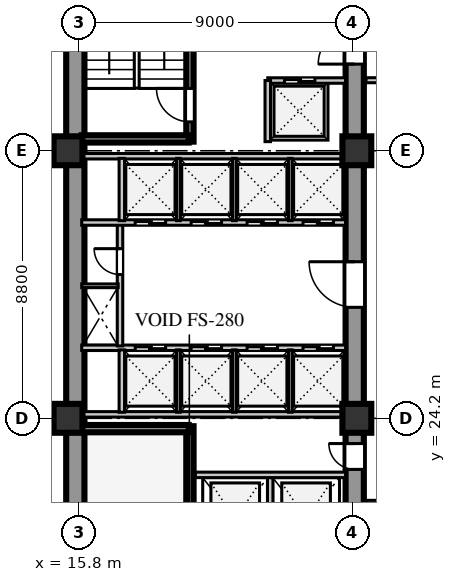
"""IFC4 building model, lengths in metres.
Left out: names, types, materials, properties, quantities, classifications, styles, units other than length and angle.
Written with IfcOpenShell. Run it as: python <this file> out.ifc"""

import sys

from ifc_helpers import new_model, si_unit, direction, frame, frame_2d, origin, origin_2d, place, context, subcontext, project, spatial, rectangle, extrude, element, fill, save


model = new_model("IFC4")
c1 = context("Model", 3, precision=1e-05, world=origin(), true_north=direction((0.0, 1.0)))
c2 = subcontext(c1, "Body", "Model", "MODEL_VIEW")
j1 = project(units=[si_unit("LENGTHUNIT", "METRE"), si_unit("PLANEANGLEUNIT", "RADIAN")], contexts=[c1])
p1 = place(None, origin())
s1 = spatial("IfcSite", under=j1, at=p1, CompositionType="ELEMENT")
p2 = place(p1, origin())
s2 = spatial("IfcBuilding", under=s1, at=p2, CompositionType="ELEMENT")
p3 = place(p2, frame((0.0, 0.0, 66.0)))
s3 = spatial("IfcBuildingStorey", under=s2, at=p3, CompositionType="ELEMENT", Elevation=66.0)
p4 = place(p3, frame((15.69, 15.81, 0.0), z_axis=(0.0, 0.0, 1.0), x_axis=(0.0, 1.0, 0.0)))
e1 = element("IfcWall", 1, at=p4, inside=s3, PredefinedType="SHEAR", context=c2, shape_type="SweptSolid", body=[
    extrude(rectangle(XDim=25.63, YDim=0.6, at=frame_2d((12.815, 0.0))), origin(), (0.0, 0.0, 1.0), 3.72),
])
p5 = place(p3, frame((24.88, 15.74, 0.0), z_axis=(0.0, 0.0, 1.0), x_axis=(0.0, 1.0, 0.0)))
e2 = element("IfcWall", 2, at=p5, inside=s3, PredefinedType="SHEAR", context=c2, shape_type="SweptSolid", body=[
    extrude(rectangle(XDim=25.76, YDim=0.6, at=frame_2d((12.88, 0.0))), origin(), (0.0, 0.0, 1.0), 3.72),
])
p6 = place(p5, frame((1.61, 0.0, 0.0)))
e3 = element("IfcOpeningElement", 3, at=p6, cuts=e2, PredefinedType="OPENING", context=c2, shape_type="SweptSolid", body=[
    extrude(rectangle(XDim=1.2, YDim=2.1, at=frame_2d((0.6, 1.05))), frame((0.0, 0.31, 0.0), z_axis=(0.0, -1.0, 0.0), x_axis=(1.0, 0.0, 0.0)), (0.0, 0.0, 1.0), 0.62),
])
p7 = place(p5, frame((6.78, 0.0, 0.0)))
e4 = element("IfcOpeningElement", 4, at=p7, cuts=e2, PredefinedType="OPENING", context=c2, shape_type="SweptSolid", body=[
    extrude(rectangle(XDim=0.85, YDim=2.06, at=frame_2d((0.425, 1.03))), frame((0.0, 0.31, 0.0), z_axis=(0.0, -1.0, 0.0), x_axis=(1.0, 0.0, 0.0)), (0.0, 0.0, 1.0), 0.62),
])
p8 = place(p5, frame((12.11, 0.0, 0.0)))
e5 = element("IfcOpeningElement", 5, at=p8, cuts=e2, PredefinedType="OPENING", context=c2, shape_type="SweptSolid", body=[
    extrude(rectangle(XDim=1.5, YDim=2.12, at=frame_2d((0.75, 1.06))), frame((0.0, 0.31, 0.0), z_axis=(0.0, -1.0, 0.0), x_axis=(1.0, 0.0, 0.0)), (0.0, 0.0, 1.0), 0.62),
])
p9 = place(p5, frame((20.11, 0.0, 0.0)))
e6 = element("IfcOpeningElement", 6, at=p9, cuts=e2, PredefinedType="OPENING", context=c2, shape_type="SweptSolid", body=[
    extrude(rectangle(XDim=1.2, YDim=2.12, at=frame_2d((0.6, 1.06))), frame((0.0, 0.31, 0.0), z_axis=(0.0, -1.0, 0.0), x_axis=(1.0, 0.0, 0.0)), (0.0, 0.0, 1.0), 0.62),
])
p10 = place(p5, frame((24.01, 0.0, 0.0)))
e7 = element("IfcOpeningElement", 7, at=p10, cuts=e2, PredefinedType="OPENING", context=c2, shape_type="SweptSolid", body=[
    extrude(rectangle(XDim=0.95, YDim=2.1, at=frame_2d((0.475, 1.05))), frame((0.0, 0.31, 0.0), z_axis=(0.0, -1.0, 0.0), x_axis=(1.0, 0.0, 0.0)), (0.0, 0.0, 1.0), 0.62),
])
for number, where, z_axis, x_axis in (
    (8, (15.45, 24.2, 0.0), (0.0, 0.0, 1.0), (1.0, 0.0, 0.0)),
    (9, (15.45, 33.0, 0.0), (0.0, 0.0, 1.0), (1.0, 0.0, 0.0)),
    (10, (24.95, 24.2, 0.0), (0.0, 0.0, 1.0), (1.0, 0.0, 0.0)),
    (11, (24.95, 33.0, 0.0), (0.0, 0.0, 1.0), (1.0, 0.0, 0.0)),
):
    element("IfcColumn", number, at=place(p3, frame(where, z_axis=z_axis, x_axis=x_axis)), inside=s3, PredefinedType="COLUMN", context=c2, shape_type="SweptSolid", body=[
        extrude(rectangle(XDim=0.95, YDim=0.95, at=origin_2d()), origin(), (0.0, 0.0, 1.0), 3.72),
    ])
p11 = place(p3, frame((19.46, 15.74, 0.0), z_axis=(0.0, 0.0, 1.0), x_axis=(0.0, 1.0, 0.0)))
e12 = element("IfcWall", 12, at=p11, inside=s3, PredefinedType="SHEAR", context=c2, shape_type="SweptSolid", body=[
    extrude(rectangle(XDim=8.2, YDim=0.24, at=frame_2d((4.1, 0.0))), origin(), (0.0, 0.0, 1.0), 4.0),
])
p12 = place(p11, frame((0.45, 0.0, 0.0)))
e13 = element("IfcOpeningElement", 13, at=p12, cuts=e12, PredefinedType="OPENING", context=c2, shape_type="SweptSolid", body=[
    extrude(rectangle(XDim=1.1, YDim=2.1, at=frame_2d((0.55, 1.05))), frame((0.0, 0.13, 0.0), z_axis=(0.0, -1.0, 0.0), x_axis=(1.0, 0.0, 0.0)), (0.0, 0.0, 1.0), 0.26),
])
p13 = place(p3, frame((15.9, 23.86, 0.0), z_axis=(0.0, 0.0, 1.0), x_axis=(1.0, 0.0, 0.0)))
e14 = element("IfcWall", 14, at=p13, inside=s3, PredefinedType="SHEAR", context=c2, shape_type="SweptSolid", body=[
    extrude(rectangle(XDim=3.52, YDim=0.24, at=frame_2d((1.76, 0.0))), origin(), (0.0, 0.0, 1.0), 4.0),
])
p14 = place(p3, frame((22.1, 19.51, 0.0), z_axis=(0.0, 0.0, 1.0), x_axis=(0.0, 1.0, 0.0)))
e15 = element("IfcWall", 15, at=p14, inside=s3, PredefinedType="SOLIDWALL", context=c2, shape_type="SweptSolid", body=[
    extrude(rectangle(XDim=2.74, YDim=0.18, at=frame_2d((1.37, 0.0))), origin(), (0.0, 0.0, 1.0), 3.72),
])
p15 = place(p3, frame((19.64, 22.34, 0.0), z_axis=(0.0, 0.0, 1.0), x_axis=(1.0, 0.0, 0.0)))
e16 = element("IfcWall", 16, at=p15, inside=s3, PredefinedType="SOLIDWALL", context=c2, shape_type="SweptSolid", body=[
    extrude(rectangle(XDim=4.94, YDim=0.18, at=frame_2d((2.47, 0.0))), origin(), (0.0, 0.0, 1.0), 3.72),
])
p16 = place(p3, frame((15.9, 26.52, 0.0), z_axis=(0.0, 0.0, 1.0), x_axis=(1.0, 0.0, 0.0)))
e17 = element("IfcWall", 17, at=p16, inside=s3, PredefinedType="SOLIDWALL", context=c2, shape_type="SweptSolid", body=[
    extrude(rectangle(XDim=8.68, YDim=0.18, at=frame_2d((4.34, 0.0))), origin(), (0.0, 0.0, 1.0), 3.72),
])
p17 = place(p16, frame((1.76, 0.0, 0.0)))
e18 = element("IfcOpeningElement", 18, at=p17, cuts=e17, PredefinedType="OPENING", context=c2, shape_type="SweptSolid", body=[
    extrude(rectangle(XDim=1.0, YDim=2.1, at=frame_2d((0.5, 1.05))), frame((0.0, 0.1, 0.0), z_axis=(0.0, -1.0, 0.0), x_axis=(1.0, 0.0, 0.0)), (0.0, 0.0, 1.0), 0.2),
])
p18 = place(p16, frame((3.6, 0.0, 0.0)))
e19 = element("IfcOpeningElement", 19, at=p18, cuts=e17, PredefinedType="OPENING", context=c2, shape_type="SweptSolid", body=[
    extrude(rectangle(XDim=1.0, YDim=2.1, at=frame_2d((0.5, 1.05))), frame((0.0, 0.1, 0.0), z_axis=(0.0, -1.0, 0.0), x_axis=(1.0, 0.0, 0.0)), (0.0, 0.0, 1.0), 0.2),
])
p19 = place(p16, frame((5.44, 0.0, 0.0)))
e20 = element("IfcOpeningElement", 20, at=p19, cuts=e17, PredefinedType="OPENING", context=c2, shape_type="SweptSolid", body=[
    extrude(rectangle(XDim=1.0, YDim=2.1, at=frame_2d((0.5, 1.05))), frame((0.0, 0.1, 0.0), z_axis=(0.0, -1.0, 0.0), x_axis=(1.0, 0.0, 0.0)), (0.0, 0.0, 1.0), 0.2),
])
p20 = place(p16, frame((7.28, 0.0, 0.0)))
e21 = element("IfcOpeningElement", 21, at=p20, cuts=e17, PredefinedType="OPENING", context=c2, shape_type="SweptSolid", body=[
    extrude(rectangle(XDim=1.0, YDim=2.1, at=frame_2d((0.5, 1.05))), frame((0.0, 0.1, 0.0), z_axis=(0.0, -1.0, 0.0), x_axis=(1.0, 0.0, 0.0)), (0.0, 0.0, 1.0), 0.2),
])
p21 = place(p3, frame((15.9, 24.33, 0.0), z_axis=(0.0, 0.0, 1.0), x_axis=(1.0, 0.0, 0.0)))
e22 = element("IfcWall", 22, at=p21, inside=s3, PredefinedType="SOLIDWALL", context=c2, shape_type="SweptSolid", body=[
    extrude(rectangle(XDim=8.68, YDim=0.18, at=frame_2d((4.34, 0.0))), origin(), (0.0, 0.0, 1.0), 3.02),
])
p22 = place(p3, frame((17.22, 24.4, 0.0), z_axis=(0.0, 0.0, 1.0), x_axis=(0.0, 1.0, 0.0)))
e23 = element("IfcWall", 23, at=p22, inside=s3, PredefinedType="SOLIDWALL", context=c2, shape_type="SweptSolid", body=[
    extrude(rectangle(XDim=2.05, YDim=0.18, at=frame_2d((1.025, 0.0))), origin(), (0.0, 0.0, 1.0), 3.72),
])
for number, where, z_axis, x_axis in (
    (24, (19.08, 24.4, 0.0), (0.0, 0.0, 1.0), (0.0, 1.0, 0.0)),
    (25, (20.92, 24.4, 0.0), (0.0, 0.0, 1.0), (0.0, 1.0, 0.0)),
    (26, (22.76, 24.4, 0.0), (0.0, 0.0, 1.0), (0.0, 1.0, 0.0)),
):
    element("IfcWall", number, at=place(p3, frame(where, z_axis=z_axis, x_axis=x_axis)), inside=s3, PredefinedType="PARTITIONING", context=c2, shape_type="SweptSolid", body=[
        extrude(rectangle(XDim=2.05, YDim=0.12, at=frame_2d((1.025, 0.0))), origin(), (0.0, 0.0, 1.0), 3.72),
    ])
p23 = place(p3, frame((17.16, 26.58, 0.0), z_axis=(0.0, 0.0, 1.0), x_axis=(0.0, 1.0, 0.0)))
e27 = element("IfcWall", 27, at=p23, inside=s3, PredefinedType="SOLIDWALL", context=c2, shape_type="SweptSolid", body=[
    extrude(rectangle(XDim=4.02, YDim=0.18, at=frame_2d((2.01, 0.0))), origin(), (0.0, 0.0, 1.0), 3.72),
])
p24 = place(p23, frame((2.35, 0.0, 0.0)))
e28 = element("IfcOpeningElement", 28, at=p24, cuts=e27, PredefinedType="OPENING", context=c2, shape_type="SweptSolid", body=[
    extrude(rectangle(XDim=0.85, YDim=2.06, at=frame_2d((0.425, 1.03))), frame((0.0, 0.1, 0.0), z_axis=(0.0, -1.0, 0.0), x_axis=(1.0, 0.0, 0.0)), (0.0, 0.0, 1.0), 0.2),
])
p25 = place(p3, frame((15.9, 28.56, 0.0), z_axis=(0.0, 0.0, 1.0), x_axis=(1.0, 0.0, 0.0)))
e29 = element("IfcWall", 29, at=p25, inside=s3, PredefinedType="PARTITIONING", context=c2, shape_type="SweptSolid", body=[
    extrude(rectangle(XDim=1.2, YDim=0.12, at=frame_2d((0.6, 0.0))), origin(), (0.0, 0.0, 1.0), 3.72),
])
p26 = place(p3, frame((15.9, 30.64, 0.0), z_axis=(0.0, 0.0, 1.0), x_axis=(1.0, 0.0, 0.0)))
e30 = element("IfcWall", 30, at=p26, inside=s3, PredefinedType="SOLIDWALL", context=c2, shape_type="SweptSolid", body=[
    extrude(rectangle(XDim=8.68, YDim=0.18, at=frame_2d((4.34, 0.0))), origin(), (0.0, 0.0, 1.0), 3.72),
])
p27 = place(p26, frame((1.76, 0.0, 0.0)))
e31 = element("IfcOpeningElement", 31, at=p27, cuts=e30, PredefinedType="OPENING", context=c2, shape_type="SweptSolid", body=[
    extrude(rectangle(XDim=1.0, YDim=2.1, at=frame_2d((0.5, 1.05))), frame((0.0, 0.1, 0.0), z_axis=(0.0, -1.0, 0.0), x_axis=(1.0, 0.0, 0.0)), (0.0, 0.0, 1.0), 0.2),
])
p28 = place(p26, frame((3.6, 0.0, 0.0)))
e32 = element("IfcOpeningElement", 32, at=p28, cuts=e30, PredefinedType="OPENING", context=c2, shape_type="SweptSolid", body=[
    extrude(rectangle(XDim=1.0, YDim=2.1, at=frame_2d((0.5, 1.05))), frame((0.0, 0.1, 0.0), z_axis=(0.0, -1.0, 0.0), x_axis=(1.0, 0.0, 0.0)), (0.0, 0.0, 1.0), 0.2),
])
p29 = place(p26, frame((5.44, 0.0, 0.0)))
e33 = element("IfcOpeningElement", 33, at=p29, cuts=e30, PredefinedType="OPENING", context=c2, shape_type="SweptSolid", body=[
    extrude(rectangle(XDim=1.0, YDim=2.1, at=frame_2d((0.5, 1.05))), frame((0.0, 0.1, 0.0), z_axis=(0.0, -1.0, 0.0), x_axis=(1.0, 0.0, 0.0)), (0.0, 0.0, 1.0), 0.2),
])
p30 = place(p26, frame((7.28, 0.0, 0.0)))
e34 = element("IfcOpeningElement", 34, at=p30, cuts=e30, PredefinedType="OPENING", context=c2, shape_type="SweptSolid", body=[
    extrude(rectangle(XDim=1.0, YDim=2.1, at=frame_2d((0.5, 1.05))), frame((0.0, 0.1, 0.0), z_axis=(0.0, -1.0, 0.0), x_axis=(1.0, 0.0, 0.0)), (0.0, 0.0, 1.0), 0.2),
])
p31 = place(p3, frame((15.9, 32.82, 0.0), z_axis=(0.0, 0.0, 1.0), x_axis=(1.0, 0.0, 0.0)))
e35 = element("IfcWall", 35, at=p31, inside=s3, PredefinedType="SOLIDWALL", context=c2, shape_type="SweptSolid", body=[
    extrude(rectangle(XDim=8.68, YDim=0.18, at=frame_2d((4.34, 0.0))), origin(), (0.0, 0.0, 1.0), 3.02),
])
p32 = place(p3, frame((17.22, 30.7, 0.0), z_axis=(0.0, 0.0, 1.0), x_axis=(0.0, 1.0, 0.0)))
e36 = element("IfcWall", 36, at=p32, inside=s3, PredefinedType="SOLIDWALL", context=c2, shape_type="SweptSolid", body=[
    extrude(rectangle(XDim=2.05, YDim=0.18, at=frame_2d((1.025, 0.0))), origin(), (0.0, 0.0, 1.0), 3.72),
])
for number, where, z_axis, x_axis in (
    (37, (19.08, 30.7, 0.0), (0.0, 0.0, 1.0), (0.0, 1.0, 0.0)),
    (38, (20.92, 30.7, 0.0), (0.0, 0.0, 1.0), (0.0, 1.0, 0.0)),
    (39, (22.76, 30.7, 0.0), (0.0, 0.0, 1.0), (0.0, 1.0, 0.0)),
):
    element("IfcWall", number, at=place(p3, frame(where, z_axis=z_axis, x_axis=x_axis)), inside=s3, PredefinedType="PARTITIONING", context=c2, shape_type="SweptSolid", body=[
        extrude(rectangle(XDim=2.05, YDim=0.12, at=frame_2d((1.025, 0.0))), origin(), (0.0, 0.0, 1.0), 3.72),
    ])
p33 = place(p3, frame((19.46, 33.3, 0.0), z_axis=(0.0, 0.0, 1.0), x_axis=(0.0, 1.0, 0.0)))
e40 = element("IfcWall", 40, at=p33, inside=s3, PredefinedType="SHEAR", context=c2, shape_type="SweptSolid", body=[
    extrude(rectangle(XDim=8.18, YDim=0.24, at=frame_2d((4.09, 0.0))), origin(), (0.0, 0.0, 1.0), 4.0),
])
p34 = place(p33, frame((0.65, 0.0, 0.0)))
e41 = element("IfcOpeningElement", 41, at=p34, cuts=e40, PredefinedType="OPENING", context=c2, shape_type="SweptSolid", body=[
    extrude(rectangle(XDim=1.1, YDim=2.1, at=frame_2d((0.55, 1.05))), frame((0.0, 0.13, 0.0), z_axis=(0.0, -1.0, 0.0), x_axis=(1.0, 0.0, 0.0)), (0.0, 0.0, 1.0), 0.26),
])
p35 = place(p3, frame((15.9, 33.39, 0.0), z_axis=(0.0, 0.0, 1.0), x_axis=(1.0, 0.0, 0.0)))
e42 = element("IfcWall", 42, at=p35, inside=s3, PredefinedType="SHEAR", context=c2, shape_type="SweptSolid", body=[
    extrude(rectangle(XDim=3.52, YDim=0.24, at=frame_2d((1.76, 0.0))), origin(), (0.0, 0.0, 1.0), 4.0),
])
p36 = place(p3, frame((22.02, 35.31, 0.0), z_axis=(0.0, 0.0, 1.0), x_axis=(1.0, 0.0, 0.0)))
e43 = element("IfcWall", 43, at=p36, inside=s3, PredefinedType="SOLIDWALL", context=c2, shape_type="SweptSolid", body=[
    extrude(rectangle(XDim=2.56, YDim=0.18, at=frame_2d((1.28, 0.0))), origin(), (0.0, 0.0, 1.0), 3.72),
])
p37 = place(p36, frame((0.55, 0.0, 0.0)))
e44 = element("IfcOpeningElement", 44, at=p37, cuts=e43, PredefinedType="OPENING", context=c2, shape_type="SweptSolid", body=[
    extrude(rectangle(XDim=1.0, YDim=2.1, at=frame_2d((0.5, 1.05))), frame((0.0, 0.1, 0.0), z_axis=(0.0, -1.0, 0.0), x_axis=(1.0, 0.0, 0.0)), (0.0, 0.0, 1.0), 0.2),
])
p38 = place(p3, frame((22.02, 33.3, 0.0), z_axis=(0.0, 0.0, 1.0), x_axis=(0.0, 1.0, 0.0)))
e45 = element("IfcWall", 45, at=p38, inside=s3, PredefinedType="SOLIDWALL", context=c2, shape_type="SweptSolid", body=[
    extrude(rectangle(XDim=2.01, YDim=0.18, at=frame_2d((1.005, 0.0))), origin(), (0.0, 0.0, 1.0), 3.72),
])
p39 = place(p3, frame((25.25, 21.42, 0.0), z_axis=(0.0, 0.0, 1.0), x_axis=(1.0, 0.0, 0.0)))
e46 = element("IfcWall", 46, at=p39, inside=s3, PredefinedType="PARTITIONING", context=c2, shape_type="SweptSolid", body=[
    extrude(rectangle(XDim=12.87, YDim=0.165, at=frame_2d((6.435, 0.0))), origin(), (0.0, 0.0, 1.0), 3.32),
])
p40 = place(p39, frame((0.825, 0.0, 0.0)))
e47 = element("IfcOpeningElement", 47, at=p40, cuts=e46, PredefinedType="OPENING", context=c2, shape_type="SweptSolid", body=[
    extrude(rectangle(XDim=0.95, YDim=2.08, at=frame_2d((0.475, 1.04))), frame((0.0, 0.093, 0.0), z_axis=(0.0, -1.0, 0.0), x_axis=(1.0, 0.0, 0.0)), (0.0, 0.0, 1.0), 0.185),
])
p41 = place(p39, frame((3.325, 0.0, 0.0)))
e48 = element("IfcOpeningElement", 48, at=p41, cuts=e46, PredefinedType="OPENING", context=c2, shape_type="SweptSolid", body=[
    extrude(rectangle(XDim=0.95, YDim=2.08, at=frame_2d((0.475, 1.04))), frame((0.0, 0.093, 0.0), z_axis=(0.0, -1.0, 0.0), x_axis=(1.0, 0.0, 0.0)), (0.0, 0.0, 1.0), 0.185),
])
p42 = place(p39, frame((5.825, 0.0, 0.0)))
e49 = element("IfcOpeningElement", 49, at=p42, cuts=e46, PredefinedType="OPENING", context=c2, shape_type="SweptSolid", body=[
    extrude(rectangle(XDim=0.95, YDim=2.08, at=frame_2d((0.475, 1.04))), frame((0.0, 0.093, 0.0), z_axis=(0.0, -1.0, 0.0), x_axis=(1.0, 0.0, 0.0)), (0.0, 0.0, 1.0), 0.185),
])
p43 = place(p39, frame((8.375, 0.0, 0.0)))
e50 = element("IfcOpeningElement", 50, at=p43, cuts=e46, PredefinedType="OPENING", context=c2, shape_type="SweptSolid", body=[
    extrude(rectangle(XDim=0.95, YDim=2.08, at=frame_2d((0.475, 1.04))), frame((0.0, 0.093, 0.0), z_axis=(0.0, -1.0, 0.0), x_axis=(1.0, 0.0, 0.0)), (0.0, 0.0, 1.0), 0.185),
])
p44 = place(p39, frame((10.995, 0.0, 0.0)))
e51 = element("IfcOpeningElement", 51, at=p44, cuts=e46, PredefinedType="OPENING", context=c2, shape_type="SweptSolid", body=[
    extrude(rectangle(XDim=0.95, YDim=2.08, at=frame_2d((0.475, 1.04))), frame((0.0, 0.093, 0.0), z_axis=(0.0, -1.0, 0.0), x_axis=(1.0, 0.0, 0.0)), (0.0, 0.0, 1.0), 0.185),
])
p45 = place(p3, frame((25.25, 35.32, 0.0), z_axis=(0.0, 0.0, 1.0), x_axis=(1.0, 0.0, 0.0)))
e52 = element("IfcWall", 52, at=p45, inside=s3, PredefinedType="PARTITIONING", context=c2, shape_type="SweptSolid", body=[
    extrude(rectangle(XDim=9.47, YDim=0.165, at=frame_2d((4.735, 0.0))), origin(), (0.0, 0.0, 1.0), 3.72),
])
p46 = place(p45, frame((1.025, 0.0, 0.0)))
e53 = element("IfcOpeningElement", 53, at=p46, cuts=e52, PredefinedType="OPENING", context=c2, shape_type="SweptSolid", body=[
    extrude(rectangle(XDim=0.95, YDim=2.08, at=frame_2d((0.475, 1.04))), frame((0.0, 0.093, 0.0), z_axis=(0.0, -1.0, 0.0), x_axis=(1.0, 0.0, 0.0)), (0.0, 0.0, 1.0), 0.185),
])
p47 = place(p45, frame((4.125, 0.0, 0.0)))
e54 = element("IfcOpeningElement", 54, at=p47, cuts=e52, PredefinedType="OPENING", context=c2, shape_type="SweptSolid", body=[
    extrude(rectangle(XDim=0.95, YDim=2.08, at=frame_2d((0.475, 1.04))), frame((0.0, 0.093, 0.0), z_axis=(0.0, -1.0, 0.0), x_axis=(1.0, 0.0, 0.0)), (0.0, 0.0, 1.0), 0.185),
])
p48 = place(p45, frame((7.365, 0.0, 0.0)))
e55 = element("IfcOpeningElement", 55, at=p48, cuts=e52, PredefinedType="OPENING", context=c2, shape_type="SweptSolid", body=[
    extrude(rectangle(XDim=0.95, YDim=2.08, at=frame_2d((0.475, 1.04))), frame((0.0, 0.093, 0.0), z_axis=(0.0, -1.0, 0.0), x_axis=(1.0, 0.0, 0.0)), (0.0, 0.0, 1.0), 0.185),
])
p49 = place(p7, frame((0.85, 0.0, 0.0), z_axis=(0.0, 0.0, 1.0), x_axis=(-1.0, 0.0, 0.0)))
e56 = element("IfcDoor", 56, at=p49, inside=s3, OperationType="SINGLE_SWING_LEFT", PredefinedType="DOOR", context=c2, shape_type="SweptSolid", body=[
    extrude(rectangle(XDim=0.85, YDim=2.06, at=frame_2d((0.425, 1.03))), frame((0.0, 0.025, 0.0), z_axis=(0.0, -1.0, 0.0), x_axis=(1.0, 0.0, 0.0)), (0.0, 0.0, 1.0), 0.05),
])
fill(e4, e56)
p50 = place(p17, origin())
e57 = element("IfcDoor", 57, at=p50, inside=s3, OperationType="DOUBLE_DOOR_SLIDING", PredefinedType="DOOR", context=c2, shape_type="SweptSolid", body=[
    extrude(rectangle(XDim=1.0, YDim=2.1, at=frame_2d((0.5, 1.05))), frame((0.0, 0.025, 0.0), z_axis=(0.0, -1.0, 0.0), x_axis=(1.0, 0.0, 0.0)), (0.0, 0.0, 1.0), 0.05),
])
fill(e18, e57)
p51 = place(p18, origin())
e58 = element("IfcDoor", 58, at=p51, inside=s3, OperationType="DOUBLE_DOOR_SLIDING", PredefinedType="DOOR", context=c2, shape_type="SweptSolid", body=[
    extrude(rectangle(XDim=1.0, YDim=2.1, at=frame_2d((0.5, 1.05))), frame((0.0, 0.025, 0.0), z_axis=(0.0, -1.0, 0.0), x_axis=(1.0, 0.0, 0.0)), (0.0, 0.0, 1.0), 0.05),
])
fill(e19, e58)
p52 = place(p19, origin())
e59 = element("IfcDoor", 59, at=p52, inside=s3, OperationType="DOUBLE_DOOR_SLIDING", PredefinedType="DOOR", context=c2, shape_type="SweptSolid", body=[
    extrude(rectangle(XDim=1.0, YDim=2.1, at=frame_2d((0.5, 1.05))), frame((0.0, 0.025, 0.0), z_axis=(0.0, -1.0, 0.0), x_axis=(1.0, 0.0, 0.0)), (0.0, 0.0, 1.0), 0.05),
])
fill(e20, e59)
p53 = place(p20, origin())
e60 = element("IfcDoor", 60, at=p53, inside=s3, OperationType="DOUBLE_DOOR_SLIDING", PredefinedType="DOOR", context=c2, shape_type="SweptSolid", body=[
    extrude(rectangle(XDim=1.0, YDim=2.1, at=frame_2d((0.5, 1.05))), frame((0.0, 0.025, 0.0), z_axis=(0.0, -1.0, 0.0), x_axis=(1.0, 0.0, 0.0)), (0.0, 0.0, 1.0), 0.05),
])
fill(e21, e60)
p54 = place(p24, origin())
e61 = element("IfcDoor", 61, at=p54, inside=s3, OperationType="SINGLE_SWING_RIGHT", PredefinedType="DOOR", context=c2, shape_type="SweptSolid", body=[
    extrude(rectangle(XDim=0.85, YDim=2.06, at=frame_2d((0.425, 1.03))), frame((0.0, 0.025, 0.0), z_axis=(0.0, -1.0, 0.0), x_axis=(1.0, 0.0, 0.0)), (0.0, 0.0, 1.0), 0.05),
])
fill(e28, e61)
p55 = place(p8, frame((1.5, 0.0, 0.0), z_axis=(0.0, 0.0, 1.0), x_axis=(-1.0, 0.0, 0.0)))
e62 = element("IfcDoor", 62, at=p55, inside=s3, OperationType="SINGLE_SWING_LEFT", PredefinedType="DOOR", context=c2, shape_type="SweptSolid", body=[
    extrude(rectangle(XDim=1.5, YDim=2.12, at=frame_2d((0.75, 1.06))), frame((0.0, 0.025, 0.0), z_axis=(0.0, -1.0, 0.0), x_axis=(1.0, 0.0, 0.0)), (0.0, 0.0, 1.0), 0.05),
])
fill(e5, e62)
p56 = place(p27, frame((1.0, 0.0, 0.0), z_axis=(0.0, 0.0, 1.0), x_axis=(-1.0, 0.0, 0.0)))
e63 = element("IfcDoor", 63, at=p56, inside=s3, OperationType="DOUBLE_DOOR_SLIDING", PredefinedType="DOOR", context=c2, shape_type="SweptSolid", body=[
    extrude(rectangle(XDim=1.0, YDim=2.1, at=frame_2d((0.5, 1.05))), frame((0.0, 0.025, 0.0), z_axis=(0.0, -1.0, 0.0), x_axis=(1.0, 0.0, 0.0)), (0.0, 0.0, 1.0), 0.05),
])
fill(e31, e63)
p57 = place(p28, frame((1.0, 0.0, 0.0), z_axis=(0.0, 0.0, 1.0), x_axis=(-1.0, 0.0, 0.0)))
e64 = element("IfcDoor", 64, at=p57, inside=s3, OperationType="DOUBLE_DOOR_SLIDING", PredefinedType="DOOR", context=c2, shape_type="SweptSolid", body=[
    extrude(rectangle(XDim=1.0, YDim=2.1, at=frame_2d((0.5, 1.05))), frame((0.0, 0.025, 0.0), z_axis=(0.0, -1.0, 0.0), x_axis=(1.0, 0.0, 0.0)), (0.0, 0.0, 1.0), 0.05),
])
fill(e32, e64)
p58 = place(p29, frame((1.0, 0.0, 0.0), z_axis=(0.0, 0.0, 1.0), x_axis=(-1.0, 0.0, 0.0)))
e65 = element("IfcDoor", 65, at=p58, inside=s3, OperationType="DOUBLE_DOOR_SLIDING", PredefinedType="DOOR", context=c2, shape_type="SweptSolid", body=[
    extrude(rectangle(XDim=1.0, YDim=2.1, at=frame_2d((0.5, 1.05))), frame((0.0, 0.025, 0.0), z_axis=(0.0, -1.0, 0.0), x_axis=(1.0, 0.0, 0.0)), (0.0, 0.0, 1.0), 0.05),
])
fill(e33, e65)
p59 = place(p30, frame((1.0, 0.0, 0.0), z_axis=(0.0, 0.0, 1.0), x_axis=(-1.0, 0.0, 0.0)))
e66 = element("IfcDoor", 66, at=p59, inside=s3, OperationType="DOUBLE_DOOR_SLIDING", PredefinedType="DOOR", context=c2, shape_type="SweptSolid", body=[
    extrude(rectangle(XDim=1.0, YDim=2.1, at=frame_2d((0.5, 1.05))), frame((0.0, 0.025, 0.0), z_axis=(0.0, -1.0, 0.0), x_axis=(1.0, 0.0, 0.0)), (0.0, 0.0, 1.0), 0.05),
])
fill(e34, e66)
p60 = place(p34, origin())
e67 = element("IfcDoor", 67, at=p60, inside=s3, OperationType="SINGLE_SWING_RIGHT", PredefinedType="DOOR", context=c2, shape_type="SweptSolid", body=[
    extrude(rectangle(XDim=1.1, YDim=2.1, at=frame_2d((0.55, 1.05))), frame((0.0, 0.025, 0.0), z_axis=(0.0, -1.0, 0.0), x_axis=(1.0, 0.0, 0.0)), (0.0, 0.0, 1.0), 0.05),
])
fill(e41, e67)
p61 = place(p9, frame((1.2, 0.0, 0.0), z_axis=(0.0, 0.0, 1.0), x_axis=(-1.0, 0.0, 0.0)))
e68 = element("IfcDoor", 68, at=p61, inside=s3, OperationType="SINGLE_SWING_RIGHT", PredefinedType="DOOR", context=c2, shape_type="SweptSolid", body=[
    extrude(rectangle(XDim=1.2, YDim=2.12, at=frame_2d((0.6, 1.06))), frame((0.0, 0.025, 0.0), z_axis=(0.0, -1.0, 0.0), x_axis=(1.0, 0.0, 0.0)), (0.0, 0.0, 1.0), 0.05),
])
fill(e6, e68)
p62 = place(p37, origin())
e69 = element("IfcDoor", 69, at=p62, inside=s3, OperationType="DOUBLE_DOOR_SLIDING", PredefinedType="DOOR", context=c2, shape_type="SweptSolid", body=[
    extrude(rectangle(XDim=1.0, YDim=2.1, at=frame_2d((0.5, 1.05))), frame((0.0, 0.025, 0.0), z_axis=(0.0, -1.0, 0.0), x_axis=(1.0, 0.0, 0.0)), (0.0, 0.0, 1.0), 0.05),
])
fill(e44, e69)
save(model, sys.argv[1])
